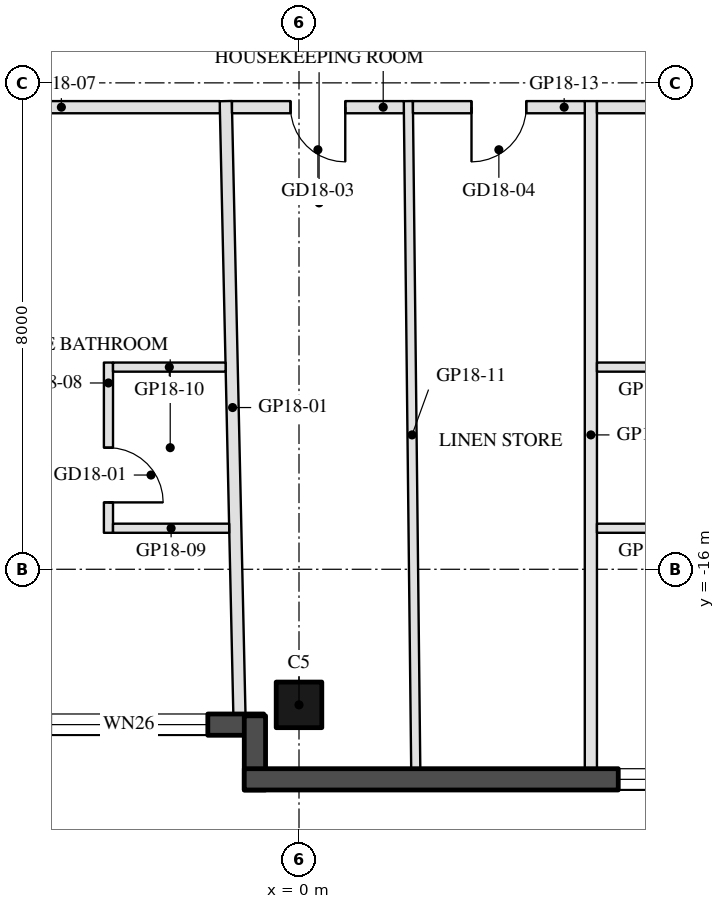
"""IFC4 building model, lengths in metres.
Left out: names, types, materials, properties, quantities, classifications, styles, units other than length and angle.
Written with IfcOpenShell. Run it as: python <this file> out.ifc"""

import sys

from ifc_helpers import new_model, si_unit, direction, frame, frame_2d, origin, origin_2d, place, context, subcontext, project, spatial, rectangle, hollow_rectangle, extrude, element, fill, save


model = new_model("IFC4")
c1 = context("Model", 3, precision=1e-05, world=origin(), true_north=direction((0.0, 1.0)))
c2 = subcontext(c1, "Body", "Model", "MODEL_VIEW")
j1 = project(units=[si_unit("LENGTHUNIT", "METRE"), si_unit("PLANEANGLEUNIT", "RADIAN")], contexts=[c1])
p1 = place(None, origin())
s1 = spatial("IfcSite", under=j1, at=p1, CompositionType="ELEMENT")
p2 = place(p1, origin())
s2 = spatial("IfcBuilding", under=s1, at=p2, CompositionType="ELEMENT")
p3 = place(p2, frame((0.0, 0.0, 198.4)))
s3 = spatial("IfcBuildingStorey", under=s2, at=p3, CompositionType="ELEMENT", Elevation=198.4)
p4 = place(p3, frame((0.0, -18.23, 0.0), z_axis=(0.0, 0.0, 1.0), x_axis=(-1.0, 0.0, 0.0)))
e1 = element("IfcColumn", 1, at=p4, inside=s3, PredefinedType="COLUMN", context=c2, shape_type="SweptSolid", body=[
    extrude(hollow_rectangle(XDim=0.75, YDim=0.75, WallThickness=0.035, at=origin_2d()), origin(), (0.0, 0.0, 1.0), 3.7),
])
p5 = place(p3, frame((-7.32, -18.555, 0.0), z_axis=(0.0, 0.0, 1.0), x_axis=(1.0, 0.0, 0.0)))
e2 = element("IfcWall", 2, at=p5, inside=s3, PredefinedType="SOLIDWALL", context=c2, shape_type="SweptSolid", body=[
    extrude(rectangle(XDim=6.74, YDim=0.35, at=frame_2d((3.37, 0.0))), origin(), (0.0, 0.0, 1.0), 3.55),
])
p6 = place(p5, frame((0.32, 0.0, 0.3)))
e3 = element("IfcOpeningElement", 3, at=p6, cuts=e2, PredefinedType="OPENING", context=c2, shape_type="SweptSolid", body=[
    extrude(rectangle(XDim=2.6, YDim=2.65, at=frame_2d((1.3, 1.325))), frame((0.0, 0.185, 0.0), z_axis=(0.0, -1.0, 0.0), x_axis=(1.0, 0.0, 0.0)), (0.0, 0.0, 1.0), 0.37),
])
p7 = place(p5, frame((3.22, 0.0, 0.3)))
e4 = element("IfcOpeningElement", 4, at=p7, cuts=e2, PredefinedType="OPENING", context=c2, shape_type="SweptSolid", body=[
    extrude(rectangle(XDim=2.6, YDim=2.65, at=frame_2d((1.3, 1.325))), frame((0.0, 0.185, 0.0), z_axis=(0.0, -1.0, 0.0), x_axis=(1.0, 0.0, 0.0)), (0.0, 0.0, 1.0), 0.37),
])
p8 = place(p3, frame((-0.725, -18.41, 0.0), z_axis=(0.0, 0.0, 1.0), x_axis=(0.0, -1.0, 0.0)))
e5 = element("IfcWall", 5, at=p8, inside=s3, PredefinedType="SOLIDWALL", context=c2, shape_type="SweptSolid", body=[
    extrude(rectangle(XDim=1.22, YDim=0.35, at=frame_2d((0.61, 0.0))), origin(), (0.0, 0.0, 1.0), 3.55),
])
p9 = place(p3, frame((-0.9, -19.455, 0.0), z_axis=(0.0, 0.0, 1.0), x_axis=(1.0, 0.0, 0.0)))
e6 = element("IfcWall", 6, at=p9, inside=s3, PredefinedType="SOLIDWALL", context=c2, shape_type="SweptSolid", body=[
    extrude(rectangle(XDim=9.7, YDim=0.35, at=frame_2d((4.85, 0.0))), origin(), (0.0, 0.0, 1.0), 3.55),
])
p10 = place(p9, frame((6.15, 0.0, 0.3)))
e7 = element("IfcOpeningElement", 7, at=p10, cuts=e6, PredefinedType="OPENING", context=c2, shape_type="SweptSolid", body=[
    extrude(rectangle(XDim=1.9, YDim=2.65, at=frame_2d((0.95, 1.325))), frame((0.0, 0.185, 0.0), z_axis=(0.0, -1.0, 0.0), x_axis=(1.0, 0.0, 0.0)), (0.0, 0.0, 1.0), 0.37),
])
p11 = place(p3, frame((-0.98, -18.38, 0.0), z_axis=(0.0, 0.0, 1.0), x_axis=(-0.022277513004, 0.999751825412, 0.0)))
e8 = element("IfcWall", 8, at=p11, inside=s3, PredefinedType="PARTITIONING", context=c2, shape_type="SweptSolid", body=[
    extrude(rectangle(XDim=10.082, YDim=0.2, at=frame_2d((5.041, 0.0))), origin(), (0.0, 0.0, 1.0), 3.06),
])
p12 = place(p3, frame((4.8, -19.28, 0.0), z_axis=(0.0, 0.0, 1.0), x_axis=(0.0, 1.0, 0.0)))
e9 = element("IfcWall", 9, at=p12, inside=s3, PredefinedType="PARTITIONING", context=c2, shape_type="SweptSolid", body=[
    extrude(rectangle(XDim=10.98, YDim=0.2, at=frame_2d((5.49, 0.0))), origin(), (0.0, 0.0, 1.0), 3.06),
])
p13 = place(p3, frame((-1.302, -8.4, 0.0), z_axis=(0.0, 0.0, 1.0), x_axis=(-1.0, 0.0, 0.0)))
e10 = element("IfcWall", 10, at=p13, inside=s3, PredefinedType="PARTITIONING", context=c2, shape_type="SweptSolid", body=[
    extrude(rectangle(XDim=8.686, YDim=0.2, at=frame_2d((4.343, 0.0))), origin(), (0.0, 0.0, 1.0), 2.95),
])
p14 = place(p13, frame((3.843, 0.0, 0.0)))
e11 = element("IfcOpeningElement", 11, at=p14, cuts=e10, PredefinedType="OPENING", context=c2, shape_type="SweptSolid", body=[
    extrude(rectangle(XDim=1.0, YDim=2.1, at=frame_2d((0.5, 1.05))), frame((0.0, 0.11, 0.0), z_axis=(0.0, -1.0, 0.0), x_axis=(1.0, 0.0, 0.0)), (0.0, 0.0, 1.0), 0.22),
])
p15 = place(p3, frame((-3.134, -12.6, 0.0), z_axis=(0.0, 0.0, 1.0), x_axis=(0.0, -1.0, 0.0)))
e12 = element("IfcWall", 12, at=p15, inside=s3, PredefinedType="PARTITIONING", context=c2, shape_type="SweptSolid", body=[
    extrude(rectangle(XDim=2.8, YDim=0.15, at=frame_2d((1.4, 0.0))), origin(), (0.0, 0.0, 1.0), 3.55),
])
p16 = place(p15, frame((1.4, 0.0, 0.0)))
e13 = element("IfcOpeningElement", 13, at=p16, cuts=e12, PredefinedType="OPENING", context=c2, shape_type="SweptSolid", body=[
    extrude(rectangle(XDim=0.9, YDim=2.1, at=frame_2d((0.45, 1.05))), frame((0.0, 0.085, 0.0), z_axis=(0.0, -1.0, 0.0), x_axis=(1.0, 0.0, 0.0)), (0.0, 0.0, 1.0), 0.17),
])
p17 = place(p3, frame((-3.059, -15.325, 0.0), z_axis=(0.0, 0.0, 1.0), x_axis=(1.0, 0.0, 0.0)))
e14 = element("IfcWall", 14, at=p17, inside=s3, PredefinedType="PARTITIONING", context=c2, shape_type="SweptSolid", body=[
    extrude(rectangle(XDim=1.91, YDim=0.15, at=frame_2d((0.955, 0.0))), origin(), (0.0, 0.0, 1.0), 3.55),
])
p18 = place(p3, frame((-3.059, -12.675, 0.0), z_axis=(0.0, 0.0, 1.0), x_axis=(1.0, 0.0, 0.0)))
e15 = element("IfcWall", 15, at=p18, inside=s3, PredefinedType="PARTITIONING", context=c2, shape_type="SweptSolid", body=[
    extrude(rectangle(XDim=1.852, YDim=0.15, at=frame_2d((0.926, 0.0))), origin(), (0.0, 0.0, 1.0), 3.55),
])
p19 = place(p3, frame((1.92, -19.28, 0.0), z_axis=(0.0, 0.0, 1.0), x_axis=(-0.011116847578, 0.999938205941, 0.0)))
e16 = element("IfcWall", 16, at=p19, inside=s3, PredefinedType="PARTITIONING", context=c2, shape_type="SweptSolid", body=[
    extrude(rectangle(XDim=10.981, YDim=0.15, at=frame_2d((5.49, 0.0))), origin(), (0.0, 0.0, 1.0), 3.06),
])
p20 = place(p3, frame((1.724, -8.4, 0.0), z_axis=(0.0, 0.0, 1.0), x_axis=(-1.0, 0.0, 0.0)))
e17 = element("IfcWall", 17, at=p20, inside=s3, PredefinedType="PARTITIONING", context=c2, shape_type="SweptSolid", body=[
    extrude(rectangle(XDim=2.826, YDim=0.2, at=frame_2d((1.413, 0.0))), origin(), (0.0, 0.0, 1.0), 2.95),
])
p21 = place(p20, frame((0.963, 0.0, 0.0)))
e18 = element("IfcOpeningElement", 18, at=p21, cuts=e17, PredefinedType="OPENING", context=c2, shape_type="SweptSolid", body=[
    extrude(rectangle(XDim=0.9, YDim=2.1, at=frame_2d((0.45, 1.05))), frame((0.0, 0.11, 0.0), z_axis=(0.0, -1.0, 0.0), x_axis=(1.0, 0.0, 0.0)), (0.0, 0.0, 1.0), 0.22),
])
p22 = place(p3, frame((4.7, -8.4, 0.0), z_axis=(0.0, 0.0, 1.0), x_axis=(-1.0, 0.0, 0.0)))
e19 = element("IfcWall", 19, at=p22, inside=s3, PredefinedType="PARTITIONING", context=c2, shape_type="SweptSolid", body=[
    extrude(rectangle(XDim=2.826, YDim=0.2, at=frame_2d((1.413, 0.0))), origin(), (0.0, 0.0, 1.0), 2.95),
])
p23 = place(p22, frame((0.963, 0.0, 0.0)))
e20 = element("IfcOpeningElement", 20, at=p23, cuts=e19, PredefinedType="OPENING", context=c2, shape_type="SweptSolid", body=[
    extrude(rectangle(XDim=0.9, YDim=2.1, at=frame_2d((0.45, 1.05))), frame((0.0, 0.11, 0.0), z_axis=(0.0, -1.0, 0.0), x_axis=(1.0, 0.0, 0.0)), (0.0, 0.0, 1.0), 0.22),
])
p24 = place(p3, frame((9.988, -8.4, 0.0), z_axis=(0.0, 0.0, 1.0), x_axis=(-1.0, 0.0, 0.0)))
e21 = element("IfcWall", 21, at=p24, inside=s3, PredefinedType="PARTITIONING", context=c2, shape_type="SweptSolid", body=[
    extrude(rectangle(XDim=5.088, YDim=0.2, at=frame_2d((2.544, 0.0))), origin(), (0.0, 0.0, 1.0), 2.95),
])
p25 = place(p24, frame((2.044, 0.0, 0.0)))
e22 = element("IfcOpeningElement", 22, at=p25, cuts=e21, PredefinedType="OPENING", context=c2, shape_type="SweptSolid", body=[
    extrude(rectangle(XDim=1.0, YDim=2.1, at=frame_2d((0.5, 1.05))), frame((0.0, 0.11, 0.0), z_axis=(0.0, -1.0, 0.0), x_axis=(1.0, 0.0, 0.0)), (0.0, 0.0, 1.0), 0.22),
])
for number, where, z_axis, x_axis in (
    (23, (4.9, -15.325, 0.0), (0.0, 0.0, 1.0), (1.0, 0.0, 0.0)),
    (24, (4.9, -12.675, 0.0), (0.0, 0.0, 1.0), (1.0, 0.0, 0.0)),
):
    element("IfcWall", number, at=place(p3, frame(where, z_axis=z_axis, x_axis=x_axis)), inside=s3, PredefinedType="PARTITIONING", context=c2, shape_type="SweptSolid", body=[
        extrude(rectangle(XDim=1.85, YDim=0.15, at=frame_2d((0.925, 0.0))), origin(), (0.0, 0.0, 1.0), 3.55),
    ])
p26 = place(p7, origin())
e25 = element("IfcWindow", 25, at=p26, inside=s3, PartitioningType="SINGLE_PANEL", PredefinedType="WINDOW", context=c2, shape_type="SweptSolid", body=[
    extrude(rectangle(XDim=2.6, YDim=2.65, at=frame_2d((1.3, 1.325))), frame((0.0, 0.03, 0.0), z_axis=(0.0, -1.0, 0.0), x_axis=(1.0, 0.0, 0.0)), (0.0, 0.0, 1.0), 0.06),
])
fill(e4, e25)
p27 = place(p10, origin())
e26 = element("IfcWindow", 26, at=p27, inside=s3, PartitioningType="SINGLE_PANEL", PredefinedType="WINDOW", context=c2, shape_type="SweptSolid", body=[
    extrude(rectangle(XDim=1.9, YDim=2.65, at=frame_2d((0.95, 1.325))), frame((0.0, 0.03, 0.0), z_axis=(0.0, -1.0, 0.0), x_axis=(1.0, 0.0, 0.0)), (0.0, 0.0, 1.0), 0.06),
])
fill(e7, e26)
p28 = place(p16, origin())
e27 = element("IfcDoor", 27, at=p28, inside=s3, OperationType="SINGLE_SWING_RIGHT", PredefinedType="DOOR", context=c2, shape_type="SweptSolid", body=[
    extrude(rectangle(XDim=0.9, YDim=2.1, at=frame_2d((0.45, 1.05))), frame((0.0, 0.025, 0.0), z_axis=(0.0, -1.0, 0.0), x_axis=(1.0, 0.0, 0.0)), (0.0, 0.0, 1.0), 0.05),
])
fill(e13, e27)
p29 = place(p21, origin())
e28 = element("IfcDoor", 28, at=p29, inside=s3, OperationType="SINGLE_SWING_LEFT", PredefinedType="DOOR", context=c2, shape_type="SweptSolid", body=[
    extrude(rectangle(XDim=0.9, YDim=2.1, at=frame_2d((0.45, 1.05))), frame((0.0, 0.025, 0.0), z_axis=(0.0, -1.0, 0.0), x_axis=(1.0, 0.0, 0.0)), (0.0, 0.0, 1.0), 0.05),
])
fill(e18, e28)
p30 = place(p23, origin())
e29 = element("IfcDoor", 29, at=p30, inside=s3, OperationType="SINGLE_SWING_RIGHT", PredefinedType="DOOR", context=c2, shape_type="SweptSolid", body=[
    extrude(rectangle(XDim=0.9, YDim=2.1, at=frame_2d((0.45, 1.05))), frame((0.0, 0.025, 0.0), z_axis=(0.0, -1.0, 0.0), x_axis=(1.0, 0.0, 0.0)), (0.0, 0.0, 1.0), 0.05),
])
fill(e20, e29)
save(model, sys.argv[1])
